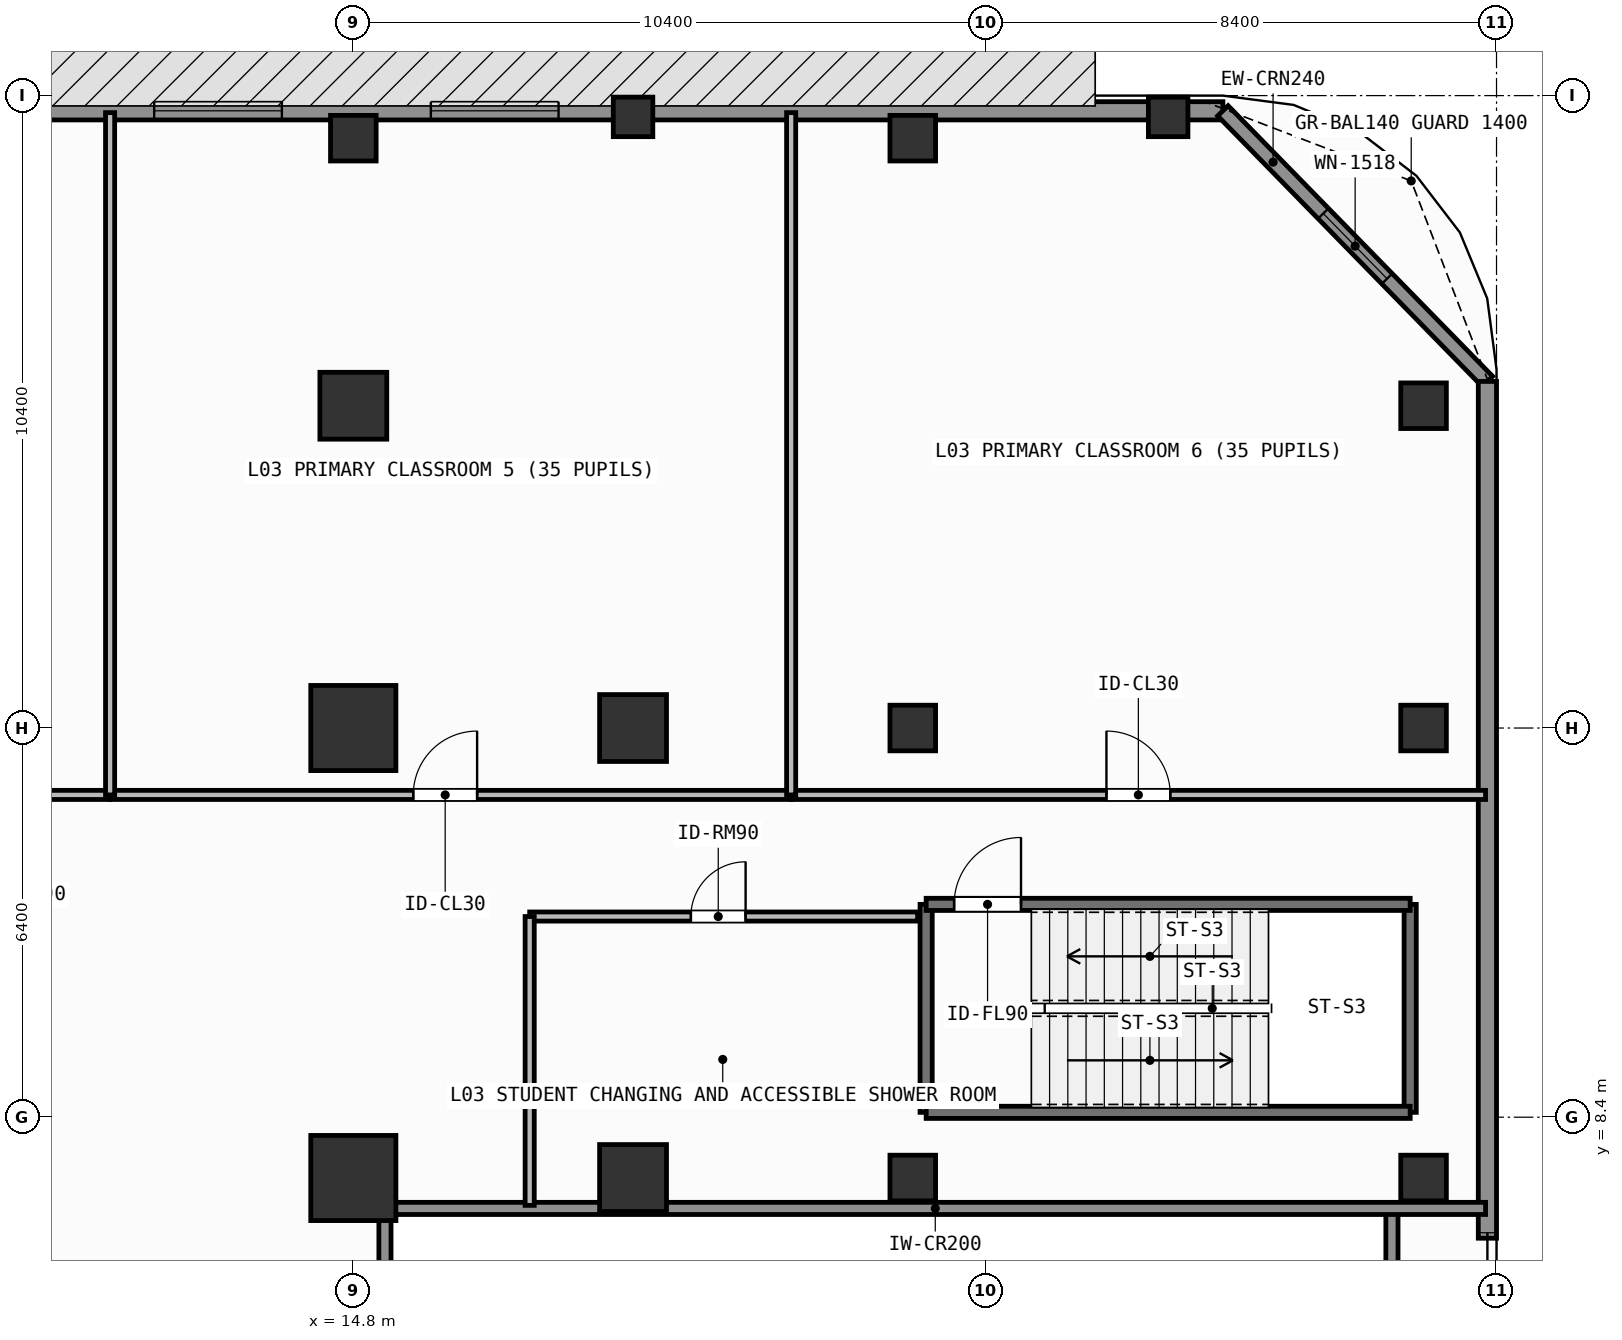
"""IFC4 building model, lengths in metres.
Left out: names, types, materials, properties, quantities, classifications, styles, units other than length and angle.
Written with IfcOpenShell. Run it as: python <this file> out.ifc"""

import sys

from ifc_helpers import new_model, si_unit, direction, frame, frame_2d, origin, origin_2d, place, context, subcontext, project, spatial, rectangle, extrude, element, fill, save


model = new_model("IFC4")
c1 = context("Model", 3, precision=1e-05, world=origin(), true_north=direction((0.0, 1.0)))
c2 = subcontext(c1, "Body", "Model", "MODEL_VIEW")
j1 = project(units=[si_unit("LENGTHUNIT", "METRE"), si_unit("PLANEANGLEUNIT", "RADIAN")], contexts=[c1])
p1 = place(None, origin())
s1 = spatial("IfcSite", under=j1, at=p1, CompositionType="ELEMENT")
p2 = place(p1, origin())
s2 = spatial("IfcBuilding", under=s1, at=p2, CompositionType="ELEMENT")
p3 = place(p2, frame((0.0, 0.0, 9.0)))
s3 = spatial("IfcBuildingStorey", under=s2, at=p3, CompositionType="ELEMENT", Elevation=9.0)
for number, where, z_axis, x_axis in (
    (1, (14.8, 14.8, 0.0), (0.0, 0.0, 1.0), (1.0, 0.0, 0.0)),
    (2, (14.8, 7.4, 0.0), (0.0, 0.0, 1.0), (1.0, 0.0, 0.0)),
):
    element("IfcColumn", number, at=place(p3, frame(where, z_axis=z_axis, x_axis=x_axis)), inside=s3, PredefinedType="COLUMN", context=c2, shape_type="SweptSolid", body=[
        extrude(rectangle(XDim=1.4, YDim=1.4, at=origin_2d()), origin(), (0.0, 0.0, 1.0), 4.2),
    ])
for number, where, z_axis, x_axis in (
    (3, (19.4, 7.4, 0.0), (0.0, 0.0, 1.0), (1.0, 0.0, 0.0)),
    (4, (19.4, 14.8, 0.0), (0.0, 0.0, 1.0), (1.0, 0.0, 0.0)),
    (5, (14.8, 20.1, 0.0), (0.0, 0.0, 1.0), (1.0, 0.0, 0.0)),
):
    element("IfcColumn", number, at=place(p3, frame(where, z_axis=z_axis, x_axis=x_axis)), inside=s3, PredefinedType="COLUMN", context=c2, shape_type="SweptSolid", body=[
        extrude(rectangle(XDim=1.1, YDim=1.1, at=origin_2d()), origin(), (0.0, 0.0, 1.0), 4.2),
    ])
for number, where, z_axis, x_axis in (
    (6, (14.8, 24.5, 0.0), (0.0, 0.0, 1.0), (1.0, 0.0, 0.0)),
    (7, (24.0, 7.4, 0.0), (0.0, 0.0, 1.0), (1.0, 0.0, 0.0)),
    (8, (24.0, 14.8, 0.0), (0.0, 0.0, 1.0), (1.0, 0.0, 0.0)),
    (9, (24.0, 24.5, 0.0), (0.0, 0.0, 1.0), (1.0, 0.0, 0.0)),
    (10, (32.4, 7.4, 0.0), (0.0, 0.0, 1.0), (1.0, 0.0, 0.0)),
    (11, (32.4, 14.8, 0.0), (0.0, 0.0, 1.0), (1.0, 0.0, 0.0)),
    (12, (32.4, 20.1, 0.0), (0.0, 0.0, 1.0), (1.0, 0.0, 0.0)),
):
    element("IfcColumn", number, at=place(p3, frame(where, z_axis=z_axis, x_axis=x_axis)), inside=s3, PredefinedType="COLUMN", context=c2, shape_type="SweptSolid", body=[
        extrude(rectangle(XDim=0.75, YDim=0.75, at=origin_2d()), origin(), (0.0, 0.0, 1.0), 4.2),
    ])
for number, where, z_axis, x_axis in (
    (13, (19.4, 24.85, 0.0), (0.0, 0.0, 1.0), (1.0, 0.0, 0.0)),
    (14, (28.2, 24.85, 0.0), (0.0, 0.0, 1.0), (1.0, 0.0, 0.0)),
):
    element("IfcColumn", number, at=place(p3, frame(where, z_axis=z_axis, x_axis=x_axis)), inside=s3, PredefinedType="PILASTER", context=c2, shape_type="SweptSolid", body=[
        extrude(rectangle(XDim=0.65, YDim=0.65, at=origin_2d()), origin(), (0.0, 0.0, 1.0), 4.2),
    ])
p4 = place(p3, frame((-29.1, 24.95, 0.0), z_axis=(0.0, 0.0, 1.0), x_axis=(1.0, 0.0, 0.0)))
e15 = element("IfcWall", 15, at=p4, inside=s3, PredefinedType="SOLIDWALL", context=c2, shape_type="SweptSolid", body=[
    extrude(rectangle(XDim=58.2, YDim=0.3, at=frame_2d((29.1, 0.0))), origin(), (0.0, 0.0, 1.0), 3.96),
])
p5 = place(p4, frame((24.35, 0.0, 0.85)))
e16 = element("IfcOpeningElement", 16, at=p5, cuts=e15, PredefinedType="OPENING", context=c2, shape_type="SweptSolid", body=[
    extrude(rectangle(XDim=2.1, YDim=2.2, at=frame_2d((1.05, 1.1))), frame((0.0, 0.16, 0.0), z_axis=(0.0, -1.0, 0.0), x_axis=(1.0, 0.0, 0.0)), (0.0, 0.0, 1.0), 0.32),
])
p6 = place(p4, frame((31.75, 0.0, 0.85)))
e17 = element("IfcOpeningElement", 17, at=p6, cuts=e15, PredefinedType="OPENING", context=c2, shape_type="SweptSolid", body=[
    extrude(rectangle(XDim=2.1, YDim=2.2, at=frame_2d((1.05, 1.1))), frame((0.0, 0.16, 0.0), z_axis=(0.0, -1.0, 0.0), x_axis=(1.0, 0.0, 0.0)), (0.0, 0.0, 1.0), 0.32),
])
p7 = place(p4, frame((40.625, 0.0, 0.85)))
e18 = element("IfcOpeningElement", 18, at=p7, cuts=e15, PredefinedType="OPENING", context=c2, shape_type="SweptSolid", body=[
    extrude(rectangle(XDim=2.1, YDim=2.2, at=frame_2d((1.05, 1.1))), frame((0.0, 0.16, 0.0), z_axis=(0.0, -1.0, 0.0), x_axis=(1.0, 0.0, 0.0)), (0.0, 0.0, 1.0), 0.32),
])
p8 = place(p4, frame((45.175, 0.0, 0.85)))
e19 = element("IfcOpeningElement", 19, at=p8, cuts=e15, PredefinedType="OPENING", context=c2, shape_type="SweptSolid", body=[
    extrude(rectangle(XDim=2.1, YDim=2.2, at=frame_2d((1.05, 1.1))), frame((0.0, 0.16, 0.0), z_axis=(0.0, -1.0, 0.0), x_axis=(1.0, 0.0, 0.0)), (0.0, 0.0, 1.0), 0.32),
])
p9 = place(p3, frame((29.1, 24.95, 0.0), z_axis=(0.0, 0.0, 1.0), x_axis=(0.69901822973, -0.715103848756, 0.0)))
e20 = element("IfcWall", 20, at=p9, inside=s3, PredefinedType="SOLIDWALL", context=c2, shape_type="SweptSolid", body=[
    extrude(rectangle(XDim=6.223, YDim=0.24, at=frame_2d((3.111, 0.0))), origin(), (0.0, 0.0, 1.0), 3.96),
])
p10 = place(p9, frame((2.362, 0.0, 0.85)))
e21 = element("IfcOpeningElement", 21, at=p10, cuts=e20, PredefinedType="OPENING", context=c2, shape_type="SweptSolid", body=[
    extrude(rectangle(XDim=1.5, YDim=1.85, at=frame_2d((0.75, 0.925))), frame((0.0, 0.13, 0.0), z_axis=(0.0, -1.0, 0.0), x_axis=(1.0, 0.0, 0.0)), (0.0, 0.0, 1.0), 0.26),
])
p11 = place(p3, frame((33.45, 6.41, 0.0), z_axis=(0.0, 0.0, 1.0), x_axis=(0.0, 1.0, 0.0)))
e22 = element("IfcWall", 22, at=p11, inside=s3, PredefinedType="SOLIDWALL", context=c2, shape_type="SweptSolid", body=[
    extrude(rectangle(XDim=14.09, YDim=0.3, at=frame_2d((7.045, 0.0))), origin(), (0.0, 0.0, 1.0), 3.96),
])
for number, where, z_axis, x_axis in (
    (23, (24.22, 8.48, 0.0), (0.0, 0.0, 1.0), (0.0, 1.0, 0.0)),
    (24, (32.18, 11.9, 0.0), (0.0, 0.0, 1.0), (0.0, -1.0, 0.0)),
):
    element("IfcWall", number, at=place(p3, frame(where, z_axis=z_axis, x_axis=x_axis)), inside=s3, PredefinedType="SHEAR", context=c2, shape_type="SweptSolid", body=[
        extrude(rectangle(XDim=3.42, YDim=0.2, at=frame_2d((1.71, 0.0))), origin(), (0.0, 0.0, 1.0), 3.96),
    ])
p12 = place(p3, frame((32.18, 8.48, 0.0), z_axis=(0.0, 0.0, 1.0), x_axis=(-1.0, 0.0, 0.0)))
e25 = element("IfcWall", 25, at=p12, inside=s3, PredefinedType="SHEAR", context=c2, shape_type="SweptSolid", body=[
    extrude(rectangle(XDim=7.96, YDim=0.2, at=frame_2d((3.98, 0.0))), origin(), (0.0, 0.0, 1.0), 3.96),
])
p13 = place(p3, frame((24.22, 11.9, 0.0), z_axis=(0.0, 0.0, 1.0), x_axis=(1.0, 0.0, 0.0)))
e26 = element("IfcWall", 26, at=p13, inside=s3, PredefinedType="SHEAR", context=c2, shape_type="SweptSolid", body=[
    extrude(rectangle(XDim=7.96, YDim=0.2, at=frame_2d((3.98, 0.0))), origin(), (0.0, 0.0, 1.0), 3.96),
])
p14 = place(p13, frame((0.46, 0.0, 0.0)))
e27 = element("IfcOpeningElement", 27, at=p14, cuts=e26, PredefinedType="OPENING", context=c2, shape_type="SweptSolid", body=[
    extrude(rectangle(XDim=1.1, YDim=2.15, at=frame_2d((0.55, 1.075))), frame((0.0, 0.11, 0.0), z_axis=(0.0, -1.0, 0.0), x_axis=(1.0, 0.0, 0.0)), (0.0, 0.0, 1.0), 0.22),
])
p15 = place(p3, frame((-0.2, 13.7, 0.0), z_axis=(0.0, 0.0, 1.0), x_axis=(1.0, 0.0, 0.0)))
e28 = element("IfcWall", 28, at=p15, inside=s3, PredefinedType="PARTITIONING", context=c2, shape_type="SweptSolid", body=[
    extrude(rectangle(XDim=11.0, YDim=0.15, at=frame_2d((5.5, 0.0))), origin(), (0.0, 0.0, 1.0), 3.96),
])
p16 = place(p15, frame((4.975, 0.0, 0.0)))
e29 = element("IfcOpeningElement", 29, at=p16, cuts=e28, PredefinedType="OPENING", context=c2, shape_type="SweptSolid", body=[
    extrude(rectangle(XDim=1.05, YDim=2.2, at=frame_2d((0.525, 1.1))), frame((0.0, 0.085, 0.0), z_axis=(0.0, -1.0, 0.0), x_axis=(1.0, 0.0, 0.0)), (0.0, 0.0, 1.0), 0.17),
])
p17 = place(p3, frame((10.8, 13.7, 0.0), z_axis=(0.0, 0.0, 1.0), x_axis=(1.0, 0.0, 0.0)))
e30 = element("IfcWall", 30, at=p17, inside=s3, PredefinedType="PARTITIONING", context=c2, shape_type="SweptSolid", body=[
    extrude(rectangle(XDim=11.2, YDim=0.15, at=frame_2d((5.6, 0.0))), origin(), (0.0, 0.0, 1.0), 3.96),
])
p18 = place(p17, frame((4.986, 0.0, 0.0)))
e31 = element("IfcOpeningElement", 31, at=p18, cuts=e30, PredefinedType="OPENING", context=c2, shape_type="SweptSolid", body=[
    extrude(rectangle(XDim=1.05, YDim=2.2, at=frame_2d((0.525, 1.1))), frame((0.0, 0.085, 0.0), z_axis=(0.0, -1.0, 0.0), x_axis=(1.0, 0.0, 0.0)), (0.0, 0.0, 1.0), 0.17),
])
p19 = place(p3, frame((22.0, 13.7, 0.0), z_axis=(0.0, 0.0, 1.0), x_axis=(1.0, 0.0, 0.0)))
e32 = element("IfcWall", 32, at=p19, inside=s3, PredefinedType="PARTITIONING", context=c2, shape_type="SweptSolid", body=[
    extrude(rectangle(XDim=11.42, YDim=0.15, at=frame_2d((5.71, 0.0))), origin(), (0.0, 0.0, 1.0), 3.96),
])
p20 = place(p19, frame((5.185, 0.0, 0.0)))
e33 = element("IfcOpeningElement", 33, at=p20, cuts=e32, PredefinedType="OPENING", context=c2, shape_type="SweptSolid", body=[
    extrude(rectangle(XDim=1.05, YDim=2.2, at=frame_2d((0.525, 1.1))), frame((0.0, 0.085, 0.0), z_axis=(0.0, -1.0, 0.0), x_axis=(1.0, 0.0, 0.0)), (0.0, 0.0, 1.0), 0.17),
])
p21 = place(p3, frame((17.7, 11.7, 0.0), z_axis=(0.0, 0.0, 1.0), x_axis=(1.0, 0.0, 0.0)))
e34 = element("IfcWall", 34, at=p21, inside=s3, PredefinedType="PARTITIONING", context=c2, shape_type="SweptSolid", body=[
    extrude(rectangle(XDim=6.38, YDim=0.15, at=frame_2d((3.19, 0.0))), origin(), (0.0, 0.0, 1.0), 3.96),
])
p22 = place(p21, frame((2.651, 0.0, 0.0)))
e35 = element("IfcOpeningElement", 35, at=p22, cuts=e34, PredefinedType="OPENING", context=c2, shape_type="SweptSolid", body=[
    extrude(rectangle(XDim=0.9, YDim=2.1, at=frame_2d((0.45, 1.05))), frame((0.0, 0.085, 0.0), z_axis=(0.0, -1.0, 0.0), x_axis=(1.0, 0.0, 0.0)), (0.0, 0.0, 1.0), 0.17),
])
for number, where, z_axis, x_axis in (
    (36, (10.8, 13.7, 0.0), (0.0, 0.0, 1.0), (0.0, 1.0, 0.0)),
    (37, (22.0, 13.7, 0.0), (0.0, 0.0, 1.0), (0.0, 1.0, 0.0)),
):
    element("IfcWall", number, at=place(p3, frame(where, z_axis=z_axis, x_axis=x_axis)), inside=s3, PredefinedType="PARTITIONING", context=c2, shape_type="SweptSolid", body=[
        extrude(rectangle(XDim=11.22, YDim=0.15, at=frame_2d((5.61, 0.0))), origin(), (0.0, 0.0, 1.0), 3.96),
    ])
for number, where, z_axis, x_axis in (
    (38, (15.32, -6.9, 0.0), (0.0, 0.0, 1.0), (0.0, 1.0, 0.0)),
    (39, (31.88, -6.9, 0.0), (0.0, 0.0, 1.0), (0.0, 1.0, 0.0)),
):
    element("IfcWall", number, at=place(p3, frame(where, z_axis=z_axis, x_axis=x_axis)), inside=s3, PredefinedType="SOLIDWALL", context=c2, shape_type="SweptSolid", body=[
        extrude(rectangle(XDim=13.8, YDim=0.2, at=frame_2d((6.9, 0.0))), origin(), (0.0, 0.0, 1.0), 3.96),
    ])
p23 = place(p3, frame((15.32, 6.9, 0.0), z_axis=(0.0, 0.0, 1.0), x_axis=(1.0, 0.0, 0.0)))
e40 = element("IfcWall", 40, at=p23, inside=s3, PredefinedType="SOLIDWALL", context=c2, shape_type="SweptSolid", body=[
    extrude(rectangle(XDim=18.1, YDim=0.2, at=frame_2d((9.05, 0.0))), origin(), (0.0, 0.0, 1.0), 3.96),
])
p24 = place(p3, frame((17.7, 6.95, 0.0), z_axis=(0.0, 0.0, 1.0), x_axis=(0.0, 1.0, 0.0)))
e41 = element("IfcWall", 41, at=p24, inside=s3, PredefinedType="PARTITIONING", context=c2, shape_type="SweptSolid", body=[
    extrude(rectangle(XDim=4.75, YDim=0.15, at=frame_2d((2.375, 0.0))), origin(), (0.0, 0.0, 1.0), 3.96),
])
p25 = place(p10, origin())
e42 = element("IfcWindow", 42, at=p25, inside=s3, PartitioningType="SINGLE_PANEL", PredefinedType="WINDOW", context=c2, shape_type="SweptSolid", body=[
    extrude(rectangle(XDim=1.5, YDim=1.85, at=frame_2d((0.75, 0.925))), frame((0.0, 0.03, 0.0), z_axis=(0.0, -1.0, 0.0), x_axis=(1.0, 0.0, 0.0)), (0.0, 0.0, 1.0), 0.06),
])
fill(e21, e42)
p26 = place(p7, origin())
e43 = element("IfcWindow", 43, at=p26, inside=s3, PartitioningType="SINGLE_PANEL", PredefinedType="WINDOW", context=c2, shape_type="SweptSolid", body=[
    extrude(rectangle(XDim=2.1, YDim=2.2, at=frame_2d((1.05, 1.1))), frame((0.0, 0.03, 0.0), z_axis=(0.0, -1.0, 0.0), x_axis=(1.0, 0.0, 0.0)), (0.0, 0.0, 1.0), 0.06),
])
fill(e18, e43)
p27 = place(p8, origin())
e44 = element("IfcWindow", 44, at=p27, inside=s3, PartitioningType="SINGLE_PANEL", PredefinedType="WINDOW", context=c2, shape_type="SweptSolid", body=[
    extrude(rectangle(XDim=2.1, YDim=2.2, at=frame_2d((1.05, 1.1))), frame((0.0, 0.03, 0.0), z_axis=(0.0, -1.0, 0.0), x_axis=(1.0, 0.0, 0.0)), (0.0, 0.0, 1.0), 0.06),
])
fill(e19, e44)
p28 = place(p14, origin())
e45 = element("IfcDoor", 45, at=p28, inside=s3, OperationType="SINGLE_SWING_RIGHT", PredefinedType="DOOR", context=c2, shape_type="SweptSolid", body=[
    extrude(rectangle(XDim=1.1, YDim=2.15, at=frame_2d((0.55, 1.075))), frame((0.0, 0.025, 0.0), z_axis=(0.0, -1.0, 0.0), x_axis=(1.0, 0.0, 0.0)), (0.0, 0.0, 1.0), 0.05),
])
fill(e27, e45)
p29 = place(p18, origin())
e46 = element("IfcDoor", 46, at=p29, inside=s3, OperationType="SINGLE_SWING_RIGHT", PredefinedType="DOOR", context=c2, shape_type="SweptSolid", body=[
    extrude(rectangle(XDim=1.05, YDim=2.2, at=frame_2d((0.525, 1.1))), frame((0.0, 0.025, 0.0), z_axis=(0.0, -1.0, 0.0), x_axis=(1.0, 0.0, 0.0)), (0.0, 0.0, 1.0), 0.05),
])
fill(e31, e46)
p30 = place(p20, origin())
e47 = element("IfcDoor", 47, at=p30, inside=s3, OperationType="SINGLE_SWING_LEFT", PredefinedType="DOOR", context=c2, shape_type="SweptSolid", body=[
    extrude(rectangle(XDim=1.05, YDim=2.2, at=frame_2d((0.525, 1.1))), frame((0.0, 0.025, 0.0), z_axis=(0.0, -1.0, 0.0), x_axis=(1.0, 0.0, 0.0)), (0.0, 0.0, 1.0), 0.05),
])
fill(e33, e47)
p31 = place(p22, origin())
e48 = element("IfcDoor", 48, at=p31, inside=s3, OperationType="SINGLE_SWING_RIGHT", PredefinedType="DOOR", context=c2, shape_type="SweptSolid", body=[
    extrude(rectangle(XDim=0.9, YDim=2.1, at=frame_2d((0.45, 1.05))), frame((0.0, 0.025, 0.0), z_axis=(0.0, -1.0, 0.0), x_axis=(1.0, 0.0, 0.0)), (0.0, 0.0, 1.0), 0.05),
])
fill(e35, e48)
save(model, sys.argv[1])
